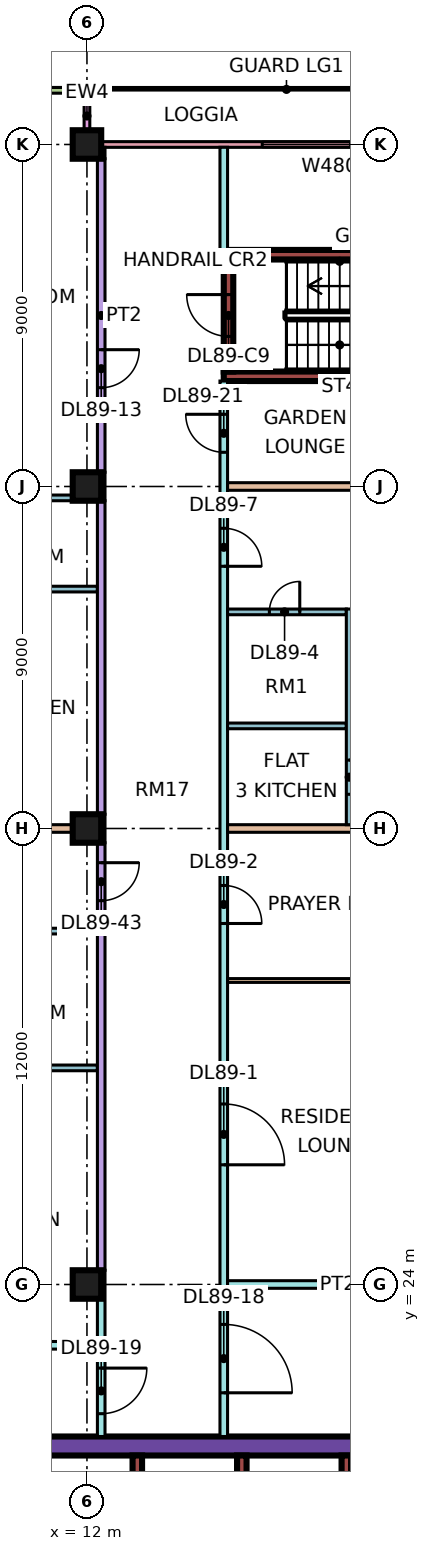
"""IFC4 building model, lengths in metres.
Left out: names, types, materials, properties, quantities, classifications, styles, units other than length and angle.
Written with IfcOpenShell. Run it as: python <this file> out.ifc"""

import sys

from ifc_helpers import new_model, si_unit, direction, frame, frame_2d, origin, origin_2d, place, context, subcontext, project, spatial, rectangle, extrude, element, fill, save


model = new_model("IFC4")
c1 = context("Model", 3, precision=1e-05, world=origin(), true_north=direction((0.0, 1.0)))
c2 = subcontext(c1, "Body", "Model", "MODEL_VIEW")
j1 = project(units=[si_unit("LENGTHUNIT", "METRE"), si_unit("PLANEANGLEUNIT", "RADIAN")], contexts=[c1])
p1 = place(None, origin())
s1 = spatial("IfcSite", under=j1, at=p1, CompositionType="ELEMENT")
p2 = place(p1, origin())
s2 = spatial("IfcBuilding", under=s1, at=p2, CompositionType="ELEMENT")
p3 = place(p2, frame((0.0, 0.0, 380.15)))
s3 = spatial("IfcBuildingStorey", under=s2, at=p3, CompositionType="ELEMENT", Elevation=380.15)
for number, where, z_axis, x_axis in (
    (1, (12.0, 24.0, 0.0), (0.0, 0.0, 1.0), (1.0, 0.0, 0.0)),
    (2, (12.0, 36.0, 0.0), (0.0, 0.0, 1.0), (1.0, 0.0, 0.0)),
    (3, (12.0, 45.0, 0.0), (0.0, 0.0, 1.0), (1.0, 0.0, 0.0)),
    (4, (12.0, 54.0, 0.0), (0.0, 0.0, 1.0), (1.0, 0.0, 0.0)),
):
    element("IfcColumn", number, at=place(p3, frame(where, z_axis=z_axis, x_axis=x_axis)), inside=s3, PredefinedType="COLUMN", context=c2, shape_type="SweptSolid", body=[
        extrude(rectangle(XDim=0.75, YDim=0.75, at=origin_2d()), origin(), (0.0, 0.0, 1.0), 3.75),
    ])
p4 = place(p3, frame((9.0, 19.75, 0.0), z_axis=(0.0, 0.0, 1.0), x_axis=(1.0, 0.0, 0.0)))
e5 = element("IfcWall", 5, at=p4, inside=s3, PredefinedType="SHEAR", context=c2, shape_type="SweptSolid", body=[
    extrude(rectangle(XDim=25.0, YDim=0.5, at=frame_2d((12.5, 0.0))), origin(), (0.0, 0.0, 1.0), 3.75),
])
p5 = place(p4, frame((19.1, 0.0, 0.0)))
e6 = element("IfcOpeningElement", 6, at=p5, cuts=e5, PredefinedType="OPENING", context=c2, shape_type="SweptSolid", body=[
    extrude(rectangle(XDim=1.8, YDim=2.4, at=frame_2d((0.9, 1.2))), frame((0.0, 0.26, 0.0), z_axis=(0.0, -1.0, 0.0), x_axis=(1.0, 0.0, 0.0)), (0.0, 0.0, 1.0), 0.52),
])
p6 = place(p3, frame((13.325, 7.5, 0.0), z_axis=(0.0, 0.0, 1.0), x_axis=(0.0, 1.0, 0.0)))
e7 = element("IfcWall", 7, at=p6, inside=s3, PredefinedType="SHEAR", context=c2, shape_type="SweptSolid", body=[
    extrude(rectangle(XDim=12.0, YDim=0.25, at=frame_2d((6.0, 0.0))), origin(), (0.0, 0.0, 1.0), 3.75),
])
for number, where, z_axis, x_axis in (
    (8, (16.075, 15.8, 0.0), (0.0, 0.0, 1.0), (0.0, 1.0, 0.0)),
    (9, (18.825, 15.8, 0.0), (0.0, 0.0, 1.0), (0.0, 1.0, 0.0)),
):
    element("IfcWall", number, at=place(p3, frame(where, z_axis=z_axis, x_axis=x_axis)), inside=s3, PredefinedType="SHEAR", context=c2, shape_type="SweptSolid", body=[
        extrude(rectangle(XDim=3.7, YDim=0.25, at=frame_2d((1.85, 0.0))), origin(), (0.0, 0.0, 1.0), 3.75),
    ])
for number, where, z_axis, x_axis in (
    (10, (15.6, 47.9, 0.0), (0.0, 0.0, 1.0), (1.0, 0.0, 0.0)),
    (11, (15.6, 51.1, 0.0), (0.0, 0.0, 1.0), (1.0, 0.0, 0.0)),
):
    element("IfcWall", number, at=place(p3, frame(where, z_axis=z_axis, x_axis=x_axis)), inside=s3, PredefinedType="SHEAR", context=c2, shape_type="SweptSolid", body=[
        extrude(rectangle(XDim=7.0, YDim=0.25, at=frame_2d((3.5, 0.0))), origin(), (0.0, 0.0, 1.0), 3.75),
    ])
p7 = place(p3, frame((15.725, 48.025, 0.0), z_axis=(0.0, 0.0, 1.0), x_axis=(0.0, 1.0, 0.0)))
e12 = element("IfcWall", 12, at=p7, inside=s3, PredefinedType="SHEAR", context=c2, shape_type="SweptSolid", body=[
    extrude(rectangle(XDim=2.95, YDim=0.25, at=frame_2d((1.475, 0.0))), origin(), (0.0, 0.0, 1.0), 3.75),
])
p8 = place(p7, frame((0.925, 0.0, 0.0)))
e13 = element("IfcOpeningElement", 13, at=p8, cuts=e12, PredefinedType="OPENING", context=c2, shape_type="SweptSolid", body=[
    extrude(rectangle(XDim=1.1, YDim=2.2, at=frame_2d((0.55, 1.1))), frame((0.0, 0.135, 0.0), z_axis=(0.0, -1.0, 0.0), x_axis=(1.0, 0.0, 0.0)), (0.0, 0.0, 1.0), 0.27),
])
p9 = place(p3, frame((22.425, 54.0, 0.0), z_axis=(0.0, 0.0, 1.0), x_axis=(-1.0, 0.0, 0.0)))
e14 = element("IfcWall", 14, at=p9, inside=s3, PredefinedType="SOLIDWALL", context=c2, shape_type="SweptSolid", body=[
    extrude(rectangle(XDim=10.35, YDim=0.15, at=frame_2d((5.175, 0.0))), origin(), (0.0, 0.0, 1.0), 3.3),
])
p10 = place(p9, frame((1.012, 0.0, 0.45)))
e15 = element("IfcOpeningElement", 15, at=p10, cuts=e14, PredefinedType="OPENING", context=c2, shape_type="SweptSolid", body=[
    extrude(rectangle(XDim=4.8, YDim=2.0, at=frame_2d((2.4, 1.0))), frame((0.0, 0.085, 0.0), z_axis=(0.0, -1.0, 0.0), x_axis=(1.0, 0.0, 0.0)), (0.0, 0.0, 1.0), 0.17),
])
p11 = place(p3, frame((12.0, 55.5, 0.0), z_axis=(0.0, 0.0, 1.0), x_axis=(0.0, -1.0, 0.0)))
e16 = element("IfcWall", 16, at=p11, inside=s3, PredefinedType="SOLIDWALL", context=c2, shape_type="SweptSolid", body=[
    extrude(rectangle(XDim=1.5, YDim=0.15, at=frame_2d((0.75, 0.0))), origin(), (0.0, 0.0, 1.0), 3.3),
])
p12 = place(p3, frame((11.925, 55.425, 0.0), z_axis=(0.0, 0.0, 1.0), x_axis=(-1.0, 0.0, 0.0)))
e17 = element("IfcWall", 17, at=p12, inside=s3, PredefinedType="SOLIDWALL", context=c2, shape_type="SweptSolid", body=[
    extrude(rectangle(XDim=10.425, YDim=0.15, at=frame_2d((5.212, 0.0))), origin(), (0.0, 0.0, 1.0), 3.3),
])
p13 = place(p12, frame((3.712, 0.0, 0.45)))
e18 = element("IfcOpeningElement", 18, at=p13, cuts=e17, PredefinedType="OPENING", context=c2, shape_type="SweptSolid", body=[
    extrude(rectangle(XDim=3.0, YDim=2.0, at=frame_2d((1.5, 1.0))), frame((0.0, 0.085, 0.0), z_axis=(0.0, -1.0, 0.0), x_axis=(1.0, 0.0, 0.0)), (0.0, 0.0, 1.0), 0.17),
])
p14 = place(p3, frame((0.0, 36.0, 0.0), z_axis=(0.0, 0.0, 1.0), x_axis=(1.0, 0.0, 0.0)))
e19 = element("IfcWall", 19, at=p14, inside=s3, PredefinedType="PARTITIONING", context=c2, shape_type="SweptSolid", body=[
    extrude(rectangle(XDim=12.275, YDim=0.2, at=frame_2d((6.137, 0.0))), origin(), (0.0, 0.0, 1.0), 3.3),
])
p15 = place(p3, frame((0.074, 22.4, 0.0), z_axis=(0.0, 0.0, 1.0), x_axis=(1.0, 0.0, 0.0)))
e20 = element("IfcWall", 20, at=p15, inside=s3, PredefinedType="PARTITIONING", context=c2, shape_type="SweptSolid", body=[
    extrude(rectangle(XDim=12.201, YDim=0.2, at=frame_2d((6.101, 0.0))), origin(), (0.0, 0.0, 1.0), 3.3),
])
p16 = place(p3, frame((7.05, 42.3, 0.0), z_axis=(0.0, 0.0, 1.0), x_axis=(1.0, 0.0, 0.0)))
e21 = element("IfcWall", 21, at=p16, inside=s3, PredefinedType="PARTITIONING", context=c2, shape_type="SweptSolid", body=[
    extrude(rectangle(XDim=5.225, YDim=0.15, at=frame_2d((2.612, 0.0))), origin(), (0.0, 0.0, 1.0), 3.3),
])
p17 = place(p3, frame((7.05, 44.7, 0.0), z_axis=(0.0, 0.0, 1.0), x_axis=(1.0, 0.0, 0.0)))
e22 = element("IfcWall", 22, at=p17, inside=s3, PredefinedType="PARTITIONING", context=c2, shape_type="SweptSolid", body=[
    extrude(rectangle(XDim=5.225, YDim=0.15, at=frame_2d((2.612, 0.0))), origin(), (0.0, 0.0, 1.0), 3.3),
])
p18 = place(p17, frame((2.175, 0.0, 0.0)))
e23 = element("IfcOpeningElement", 23, at=p18, cuts=e22, PredefinedType="OPENING", context=c2, shape_type="SweptSolid", body=[
    extrude(rectangle(XDim=0.8, YDim=2.1, at=frame_2d((0.4, 1.05))), frame((0.0, 0.085, 0.0), z_axis=(0.0, -1.0, 0.0), x_axis=(1.0, 0.0, 0.0)), (0.0, 0.0, 1.0), 0.17),
])
for number, where, z_axis, x_axis in (
    (24, (7.65, 29.7, 0.0), (0.0, 0.0, 1.0), (1.0, 0.0, 0.0)),
    (25, (7.65, 33.3, 0.0), (0.0, 0.0, 1.0), (1.0, 0.0, 0.0)),
):
    element("IfcWall", number, at=place(p3, frame(where, z_axis=z_axis, x_axis=x_axis)), inside=s3, PredefinedType="PARTITIONING", context=c2, shape_type="SweptSolid", body=[
        extrude(rectangle(XDim=4.625, YDim=0.15, at=frame_2d((2.312, 0.0))), origin(), (0.0, 0.0, 1.0), 3.3),
    ])
p19 = place(p3, frame((15.6, 20.0, 0.0), z_axis=(0.0, 0.0, 1.0), x_axis=(0.0, 1.0, 0.0)))
e26 = element("IfcWall", 26, at=p19, inside=s3, PredefinedType="PARTITIONING", context=c2, shape_type="SweptSolid", body=[
    extrude(rectangle(XDim=27.775, YDim=0.2, at=frame_2d((13.887, 0.0))), origin(), (0.0, 0.0, 1.0), 3.3),
])
p20 = place(p19, frame((7.15, 0.0, 0.0)))
e27 = element("IfcOpeningElement", 27, at=p20, cuts=e26, PredefinedType="OPENING", context=c2, shape_type="SweptSolid", body=[
    extrude(rectangle(XDim=1.6, YDim=2.1, at=frame_2d((0.8, 1.05))), frame((0.0, 0.11, 0.0), z_axis=(0.0, -1.0, 0.0), x_axis=(1.0, 0.0, 0.0)), (0.0, 0.0, 1.0), 0.22),
])
p21 = place(p19, frame((13.5, 0.0, 0.0)))
e28 = element("IfcOpeningElement", 28, at=p21, cuts=e26, PredefinedType="OPENING", context=c2, shape_type="SweptSolid", body=[
    extrude(rectangle(XDim=1.0, YDim=2.1, at=frame_2d((0.5, 1.05))), frame((0.0, 0.11, 0.0), z_axis=(0.0, -1.0, 0.0), x_axis=(1.0, 0.0, 0.0)), (0.0, 0.0, 1.0), 0.22),
])
p22 = place(p19, frame((22.9, 0.0, 0.0)))
e29 = element("IfcOpeningElement", 29, at=p22, cuts=e26, PredefinedType="OPENING", context=c2, shape_type="SweptSolid", body=[
    extrude(rectangle(XDim=1.0, YDim=2.1, at=frame_2d((0.5, 1.05))), frame((0.0, 0.11, 0.0), z_axis=(0.0, -1.0, 0.0), x_axis=(1.0, 0.0, 0.0)), (0.0, 0.0, 1.0), 0.22),
])
p23 = place(p19, frame((1.15, 0.0, 0.0)))
e30 = element("IfcOpeningElement", 30, at=p23, cuts=e26, PredefinedType="OPENING", context=c2, shape_type="SweptSolid", body=[
    extrude(rectangle(XDim=1.8, YDim=2.1, at=frame_2d((0.9, 1.05))), frame((0.0, 0.11, 0.0), z_axis=(0.0, -1.0, 0.0), x_axis=(1.0, 0.0, 0.0)), (0.0, 0.0, 1.0), 0.22),
])
p24 = place(p19, frame((25.9, 0.0, 0.0)))
e31 = element("IfcOpeningElement", 31, at=p24, cuts=e26, PredefinedType="OPENING", context=c2, shape_type="SweptSolid", body=[
    extrude(rectangle(XDim=1.0, YDim=2.1, at=frame_2d((0.5, 1.05))), frame((0.0, 0.11, 0.0), z_axis=(0.0, -1.0, 0.0), x_axis=(1.0, 0.0, 0.0)), (0.0, 0.0, 1.0), 0.22),
])
p25 = place(p3, frame((15.6, 51.225, 0.0), z_axis=(0.0, 0.0, 1.0), x_axis=(0.0, 1.0, 0.0)))
e32 = element("IfcWall", 32, at=p25, inside=s3, PredefinedType="PARTITIONING", context=c2, shape_type="SweptSolid", body=[
    extrude(rectangle(XDim=2.701, YDim=0.2, at=frame_2d((1.351, 0.0))), origin(), (0.0, 0.0, 1.0), 3.3),
])
p26 = place(p3, frame((15.7, 24.0, 0.0), z_axis=(0.0, 0.0, 1.0), x_axis=(1.0, 0.0, 0.0)))
e33 = element("IfcWall", 33, at=p26, inside=s3, PredefinedType="PARTITIONING", context=c2, shape_type="SweptSolid", body=[
    extrude(rectangle(XDim=5.8, YDim=0.2, at=frame_2d((2.9, 0.0))), origin(), (0.0, 0.0, 1.0), 3.3),
])
p27 = place(p3, frame((15.7, 32.0, 0.0), z_axis=(0.0, 0.0, 1.0), x_axis=(1.0, 0.0, 0.0)))
e34 = element("IfcWall", 34, at=p27, inside=s3, PredefinedType="PARTITIONING", context=c2, shape_type="SweptSolid", body=[
    extrude(rectangle(XDim=5.8, YDim=0.1, at=frame_2d((2.9, 0.0))), origin(), (0.0, 0.0, 1.0), 3.3),
])
p28 = place(p3, frame((15.7, 36.0, 0.0), z_axis=(0.0, 0.0, 1.0), x_axis=(1.0, 0.0, 0.0)))
e35 = element("IfcWall", 35, at=p28, inside=s3, PredefinedType="PARTITIONING", context=c2, shape_type="SweptSolid", body=[
    extrude(rectangle(XDim=8.3, YDim=0.2, at=frame_2d((4.15, 0.0))), origin(), (0.0, 0.0, 1.0), 3.3),
])
p29 = place(p3, frame((15.7, 38.7, 0.0), z_axis=(0.0, 0.0, 1.0), x_axis=(1.0, 0.0, 0.0)))
e36 = element("IfcWall", 36, at=p29, inside=s3, PredefinedType="PARTITIONING", context=c2, shape_type="SweptSolid", body=[
    extrude(rectangle(XDim=3.125, YDim=0.15, at=frame_2d((1.562, 0.0))), origin(), (0.0, 0.0, 1.0), 3.3),
])
p30 = place(p3, frame((15.7, 41.7, 0.0), z_axis=(0.0, 0.0, 1.0), x_axis=(1.0, 0.0, 0.0)))
e37 = element("IfcWall", 37, at=p30, inside=s3, PredefinedType="PARTITIONING", context=c2, shape_type="SweptSolid", body=[
    extrude(rectangle(XDim=3.125, YDim=0.15, at=frame_2d((1.562, 0.0))), origin(), (0.0, 0.0, 1.0), 3.3),
])
p31 = place(p30, frame((1.1, 0.0, 0.0)))
e38 = element("IfcOpeningElement", 38, at=p31, cuts=e37, PredefinedType="OPENING", context=c2, shape_type="SweptSolid", body=[
    extrude(rectangle(XDim=0.8, YDim=2.1, at=frame_2d((0.4, 1.05))), frame((0.0, 0.085, 0.0), z_axis=(0.0, -1.0, 0.0), x_axis=(1.0, 0.0, 0.0)), (0.0, 0.0, 1.0), 0.17),
])
p32 = place(p3, frame((15.7, 45.0, 0.0), z_axis=(0.0, 0.0, 1.0), x_axis=(1.0, 0.0, 0.0)))
e39 = element("IfcWall", 39, at=p32, inside=s3, PredefinedType="PARTITIONING", context=c2, shape_type="SweptSolid", body=[
    extrude(rectangle(XDim=8.226, YDim=0.2, at=frame_2d((4.113, 0.0))), origin(), (0.0, 0.0, 1.0), 3.3),
])
p33 = place(p3, frame((18.9, 36.1, 0.0), z_axis=(0.0, 0.0, 1.0), x_axis=(0.0, 1.0, 0.0)))
e40 = element("IfcWall", 40, at=p33, inside=s3, PredefinedType="PARTITIONING", context=c2, shape_type="SweptSolid", body=[
    extrude(rectangle(XDim=5.675, YDim=0.15, at=frame_2d((2.837, 0.0))), origin(), (0.0, 0.0, 1.0), 3.3),
])
p34 = place(p33, frame((0.8, 0.0, 0.0)))
e41 = element("IfcOpeningElement", 41, at=p34, cuts=e40, PredefinedType="OPENING", context=c2, shape_type="SweptSolid", body=[
    extrude(rectangle(XDim=0.9, YDim=2.1, at=frame_2d((0.45, 1.05))), frame((0.0, 0.085, 0.0), z_axis=(0.0, -1.0, 0.0), x_axis=(1.0, 0.0, 0.0)), (0.0, 0.0, 1.0), 0.17),
])
p35 = place(p3, frame((12.375, 20.0, 0.0), z_axis=(0.0, 0.0, 1.0), x_axis=(0.0, 1.0, 0.0)))
e42 = element("IfcWall", 42, at=p35, inside=s3, PredefinedType="PARTITIONING", context=c2, shape_type="SweptSolid", body=[
    extrude(rectangle(XDim=4.375, YDim=0.2, at=frame_2d((2.188, 0.0))), origin(), (0.0, 0.0, 1.0), 3.3),
])
p36 = place(p35, frame((0.6, 0.0, 0.0)))
e43 = element("IfcOpeningElement", 43, at=p36, cuts=e42, PredefinedType="OPENING", context=c2, shape_type="SweptSolid", body=[
    extrude(rectangle(XDim=1.2, YDim=2.1, at=frame_2d((0.6, 1.05))), frame((0.0, 0.11, 0.0), z_axis=(0.0, -1.0, 0.0), x_axis=(1.0, 0.0, 0.0)), (0.0, 0.0, 1.0), 0.22),
])
p37 = place(p3, frame((12.375, 24.375, 0.0), z_axis=(0.0, 0.0, 1.0), x_axis=(0.0, 1.0, 0.0)))
e44 = element("IfcWall", 44, at=p37, inside=s3, PredefinedType="PARTITIONING", context=c2, shape_type="SweptSolid", body=[
    extrude(rectangle(XDim=11.25, YDim=0.2, at=frame_2d((5.625, 0.0))), origin(), (0.0, 0.0, 1.0), 2.8),
])
p38 = place(p37, frame((9.725, 0.0, 0.0)))
e45 = element("IfcOpeningElement", 45, at=p38, cuts=e44, PredefinedType="OPENING", context=c2, shape_type="SweptSolid", body=[
    extrude(rectangle(XDim=1.0, YDim=2.1, at=frame_2d((0.5, 1.05))), frame((0.0, 0.11, 0.0), z_axis=(0.0, -1.0, 0.0), x_axis=(1.0, 0.0, 0.0)), (0.0, 0.0, 1.0), 0.22),
])
p39 = place(p3, frame((12.375, 35.625, 0.0), z_axis=(0.0, 0.0, 1.0), x_axis=(0.0, 1.0, 0.0)))
e46 = element("IfcWall", 46, at=p39, inside=s3, PredefinedType="PARTITIONING", context=c2, shape_type="SweptSolid", body=[
    extrude(rectangle(XDim=0.75, YDim=0.2, at=frame_2d((0.375, 0.0))), origin(), (0.0, 0.0, 1.0), 3.3),
])
p40 = place(p3, frame((12.375, 36.375, 0.0), z_axis=(0.0, 0.0, 1.0), x_axis=(0.0, 1.0, 0.0)))
e47 = element("IfcWall", 47, at=p40, inside=s3, PredefinedType="PARTITIONING", context=c2, shape_type="SweptSolid", body=[
    extrude(rectangle(XDim=8.25, YDim=0.2, at=frame_2d((4.125, 0.0))), origin(), (0.0, 0.0, 1.0), 2.8),
])
p41 = place(p3, frame((12.375, 44.625, 0.0), z_axis=(0.0, 0.0, 1.0), x_axis=(0.0, 1.0, 0.0)))
e48 = element("IfcWall", 48, at=p41, inside=s3, PredefinedType="PARTITIONING", context=c2, shape_type="SweptSolid", body=[
    extrude(rectangle(XDim=0.75, YDim=0.2, at=frame_2d((0.375, 0.0))), origin(), (0.0, 0.0, 1.0), 3.3),
])
p42 = place(p3, frame((12.375, 45.375, 0.0), z_axis=(0.0, 0.0, 1.0), x_axis=(0.0, 1.0, 0.0)))
e49 = element("IfcWall", 49, at=p42, inside=s3, PredefinedType="PARTITIONING", context=c2, shape_type="SweptSolid", body=[
    extrude(rectangle(XDim=8.25, YDim=0.2, at=frame_2d((4.125, 0.0))), origin(), (0.0, 0.0, 1.0), 2.8),
])
p43 = place(p42, frame((2.225, 0.0, 0.0)))
e50 = element("IfcOpeningElement", 50, at=p43, cuts=e49, PredefinedType="OPENING", context=c2, shape_type="SweptSolid", body=[
    extrude(rectangle(XDim=1.0, YDim=2.1, at=frame_2d((0.5, 1.05))), frame((0.0, 0.11, 0.0), z_axis=(0.0, -1.0, 0.0), x_axis=(1.0, 0.0, 0.0)), (0.0, 0.0, 1.0), 0.22),
])
p44 = place(p3, frame((12.375, 53.625, 0.0), z_axis=(0.0, 0.0, 1.0), x_axis=(0.0, 1.0, 0.0)))
e51 = element("IfcWall", 51, at=p44, inside=s3, PredefinedType="PARTITIONING", context=c2, shape_type="SweptSolid", body=[
    extrude(rectangle(XDim=0.301, YDim=0.2, at=frame_2d((0.15, 0.0))), origin(), (0.0, 0.0, 1.0), 3.3),
])
p45 = place(p10, origin())
e52 = element("IfcWindow", 52, at=p45, inside=s3, PartitioningType="SINGLE_PANEL", PredefinedType="WINDOW", context=c2, shape_type="SweptSolid", body=[
    extrude(rectangle(XDim=4.8, YDim=2.0, at=frame_2d((2.4, 1.0))), frame((0.0, 0.03, 0.0), z_axis=(0.0, -1.0, 0.0), x_axis=(1.0, 0.0, 0.0)), (0.0, 0.0, 1.0), 0.06),
])
fill(e15, e52)
p46 = place(p8, frame((1.1, 0.0, 0.0), z_axis=(0.0, 0.0, 1.0), x_axis=(-1.0, 0.0, 0.0)))
e53 = element("IfcDoor", 53, at=p46, inside=s3, OperationType="SINGLE_SWING_RIGHT", PredefinedType="DOOR", context=c2, shape_type="SweptSolid", body=[
    extrude(rectangle(XDim=1.1, YDim=2.2, at=frame_2d((0.55, 1.1))), frame((0.0, 0.025, 0.0), z_axis=(0.0, -1.0, 0.0), x_axis=(1.0, 0.0, 0.0)), (0.0, 0.0, 1.0), 0.05),
])
fill(e13, e53)
p47 = place(p20, frame((1.6, 0.0, 0.0), z_axis=(0.0, 0.0, 1.0), x_axis=(-1.0, 0.0, 0.0)))
e54 = element("IfcDoor", 54, at=p47, inside=s3, OperationType="DOUBLE_DOOR_SINGLE_SWING", PredefinedType="DOOR", context=c2, shape_type="SweptSolid", body=[
    extrude(rectangle(XDim=1.6, YDim=2.1, at=frame_2d((0.8, 1.05))), frame((0.0, 0.025, 0.0), z_axis=(0.0, -1.0, 0.0), x_axis=(1.0, 0.0, 0.0)), (0.0, 0.0, 1.0), 0.05),
])
fill(e27, e54)
p48 = place(p21, frame((1.0, 0.0, 0.0), z_axis=(0.0, 0.0, 1.0), x_axis=(-1.0, 0.0, 0.0)))
e55 = element("IfcDoor", 55, at=p48, inside=s3, OperationType="SINGLE_SWING_LEFT", PredefinedType="DOOR", context=c2, shape_type="SweptSolid", body=[
    extrude(rectangle(XDim=1.0, YDim=2.1, at=frame_2d((0.5, 1.05))), frame((0.0, 0.025, 0.0), z_axis=(0.0, -1.0, 0.0), x_axis=(1.0, 0.0, 0.0)), (0.0, 0.0, 1.0), 0.05),
])
fill(e28, e55)
p49 = place(p31, frame((0.8, 0.0, 0.0), z_axis=(0.0, 0.0, 1.0), x_axis=(-1.0, 0.0, 0.0)))
e56 = element("IfcDoor", 56, at=p49, inside=s3, OperationType="SINGLE_SWING_RIGHT", PredefinedType="DOOR", context=c2, shape_type="SweptSolid", body=[
    extrude(rectangle(XDim=0.8, YDim=2.1, at=frame_2d((0.4, 1.05))), frame((0.0, 0.025, 0.0), z_axis=(0.0, -1.0, 0.0), x_axis=(1.0, 0.0, 0.0)), (0.0, 0.0, 1.0), 0.05),
])
fill(e38, e56)
p50 = place(p34, origin())
e57 = element("IfcDoor", 57, at=p50, inside=s3, OperationType="SINGLE_SWING_RIGHT", PredefinedType="DOOR", context=c2, shape_type="SweptSolid", body=[
    extrude(rectangle(XDim=0.9, YDim=2.1, at=frame_2d((0.45, 1.05))), frame((0.0, 0.025, 0.0), z_axis=(0.0, -1.0, 0.0), x_axis=(1.0, 0.0, 0.0)), (0.0, 0.0, 1.0), 0.05),
])
fill(e41, e57)
p51 = place(p22, frame((1.0, 0.0, 0.0), z_axis=(0.0, 0.0, 1.0), x_axis=(-1.0, 0.0, 0.0)))
e58 = element("IfcDoor", 58, at=p51, inside=s3, OperationType="SINGLE_SWING_LEFT", PredefinedType="DOOR", context=c2, shape_type="SweptSolid", body=[
    extrude(rectangle(XDim=1.0, YDim=2.1, at=frame_2d((0.5, 1.05))), frame((0.0, 0.025, 0.0), z_axis=(0.0, -1.0, 0.0), x_axis=(1.0, 0.0, 0.0)), (0.0, 0.0, 1.0), 0.05),
])
fill(e29, e58)
p52 = place(p43, origin())
e59 = element("IfcDoor", 59, at=p52, inside=s3, OperationType="SINGLE_SWING_RIGHT", PredefinedType="DOOR", context=c2, shape_type="SweptSolid", body=[
    extrude(rectangle(XDim=1.0, YDim=2.1, at=frame_2d((0.5, 1.05))), frame((0.0, 0.025, 0.0), z_axis=(0.0, -1.0, 0.0), x_axis=(1.0, 0.0, 0.0)), (0.0, 0.0, 1.0), 0.05),
])
fill(e50, e59)
p53 = place(p23, frame((1.8, 0.0, 0.0), z_axis=(0.0, 0.0, 1.0), x_axis=(-1.0, 0.0, 0.0)))
e60 = element("IfcDoor", 60, at=p53, inside=s3, OperationType="DOUBLE_DOOR_SINGLE_SWING", PredefinedType="DOOR", context=c2, shape_type="SweptSolid", body=[
    extrude(rectangle(XDim=1.8, YDim=2.1, at=frame_2d((0.9, 1.05))), frame((0.0, 0.025, 0.0), z_axis=(0.0, -1.0, 0.0), x_axis=(1.0, 0.0, 0.0)), (0.0, 0.0, 1.0), 0.05),
])
fill(e30, e60)
p54 = place(p36, origin())
e61 = element("IfcDoor", 61, at=p54, inside=s3, OperationType="SINGLE_SWING_RIGHT", PredefinedType="DOOR", context=c2, shape_type="SweptSolid", body=[
    extrude(rectangle(XDim=1.2, YDim=2.1, at=frame_2d((0.6, 1.05))), frame((0.0, 0.025, 0.0), z_axis=(0.0, -1.0, 0.0), x_axis=(1.0, 0.0, 0.0)), (0.0, 0.0, 1.0), 0.05),
])
fill(e43, e61)
p55 = place(p24, frame((1.0, 0.0, 0.0), z_axis=(0.0, 0.0, 1.0), x_axis=(-1.0, 0.0, 0.0)))
e62 = element("IfcDoor", 62, at=p55, inside=s3, OperationType="SINGLE_SWING_RIGHT", PredefinedType="DOOR", context=c2, shape_type="SweptSolid", body=[
    extrude(rectangle(XDim=1.0, YDim=2.1, at=frame_2d((0.5, 1.05))), frame((0.0, 0.025, 0.0), z_axis=(0.0, -1.0, 0.0), x_axis=(1.0, 0.0, 0.0)), (0.0, 0.0, 1.0), 0.05),
])
fill(e31, e62)
p56 = place(p38, origin())
e63 = element("IfcDoor", 63, at=p56, inside=s3, OperationType="SINGLE_SWING_RIGHT", PredefinedType="DOOR", context=c2, shape_type="SweptSolid", body=[
    extrude(rectangle(XDim=1.0, YDim=2.1, at=frame_2d((0.5, 1.05))), frame((0.0, 0.025, 0.0), z_axis=(0.0, -1.0, 0.0), x_axis=(1.0, 0.0, 0.0)), (0.0, 0.0, 1.0), 0.05),
])
fill(e45, e63)
save(model, sys.argv[1])
